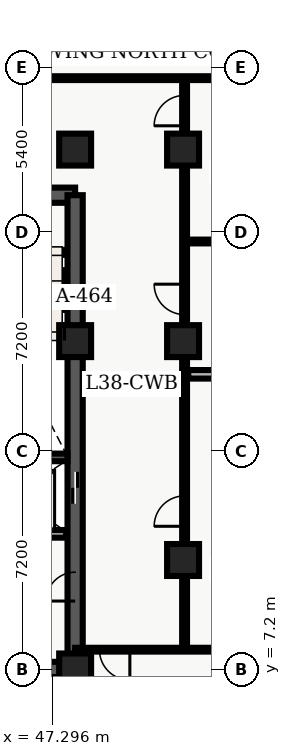
"""IFC4 building model, lengths in metres.
Left out: names, types, materials, properties, quantities, classifications, styles, units other than length and angle.
Written with IfcOpenShell. Run it as: python <this file> out.ifc"""

import sys

from ifc_helpers import new_model, entity, si_unit, converted_unit, direction, frame, origin_with_axes, origin_2d_with_axis, place, context, subcontext, project, spatial, polyline, rectangle, outline, extrude, element, fill, save


model = new_model("IFC4")
c1 = context("Model", 3, precision=1e-05, world=origin_with_axes(), true_north=direction((0.0, 1.0)))
c2 = subcontext(c1, "Body", "Model", "MODEL_VIEW")
j1 = project(units=[si_unit("LENGTHUNIT", "METRE"), converted_unit("PLANEANGLEUNIT", "DEGREE", entity("IfcPlaneAngleMeasure", 0.017), si_unit("PLANEANGLEUNIT", "RADIAN"), dimensions=[0, 0, 0, 0, 0, 0, 0])], contexts=[c1])
p1 = place(None, origin_with_axes())
s1 = spatial("IfcSite", under=j1, at=p1, CompositionType="ELEMENT")
p2 = place(p1, origin_with_axes())
s2 = spatial("IfcBuilding", under=s1, at=p2, CompositionType="ELEMENT")
p3 = place(p2, frame((0.0, 0.0, 156.3), z_axis=(0.0, 0.0, 1.0), x_axis=(1.0, 0.0, 0.0)))
s3 = spatial("IfcBuildingStorey", under=s2, at=p3, CompositionType="ELEMENT", Elevation=156.3)
p4 = place(p3, frame((40.2, 7.2, 0.0), z_axis=(0.0, 0.0, 1.0), x_axis=(1.0, 0.0, 0.0)))
e1 = element("IfcWall", 1, at=p4, inside=s3, PredefinedType="SHEAR", context=c2, shape_type="SweptSolid", body=[
    extrude(outline(polyline([(0.0, -0.25), (7.85, -0.25), (7.85, 0.25), (0.0, 0.25), (0.0, -0.25)])), origin_with_axes(), (0.0, 0.0, 1.0), 3.66),
])
p5 = place(p4, frame((2.175, 0.0, 0.0), z_axis=(0.0, 0.0, 1.0), x_axis=(1.0, 0.0, 0.0)))
e2 = element("IfcOpeningElement", 2, at=p5, cuts=e1, PredefinedType="OPENING", context=c2, shape_type="SweptSolid", body=[
    extrude(rectangle(XDim=1.05, YDim=0.52, at=origin_2d_with_axis()), origin_with_axes(), (0.0, 0.0, 1.0), 2.15),
])
p6 = place(p3, frame((40.2, 22.8, 0.0), z_axis=(0.0, 0.0, 1.0), x_axis=(1.0, 0.0, 0.0)))
e3 = element("IfcWall", 3, at=p6, inside=s3, PredefinedType="SHEAR", context=c2, shape_type="SweptSolid", body=[
    extrude(outline(polyline([(0.0, -0.25), (7.85, -0.25), (7.85, 0.25), (0.0, 0.25), (0.0, -0.25)])), origin_with_axes(), (0.0, 0.0, 1.0), 3.66),
])
p7 = place(p6, frame((5.775, 0.0, 0.0), z_axis=(0.0, 0.0, 1.0), x_axis=(1.0, 0.0, 0.0)))
e4 = element("IfcOpeningElement", 4, at=p7, cuts=e3, PredefinedType="OPENING", context=c2, shape_type="SweptSolid", body=[
    extrude(rectangle(XDim=1.05, YDim=0.52, at=origin_2d_with_axis()), origin_with_axes(), (0.0, 0.0, 1.0), 2.15),
])
p8 = place(p3, frame((48.05, 7.2, 0.0), z_axis=(0.0, 0.0, 1.0), x_axis=(0.0, 1.0, 0.0)))
e5 = element("IfcWall", 5, at=p8, inside=s3, PredefinedType="SHEAR", context=c2, shape_type="SweptSolid", body=[
    extrude(outline(polyline([(0.0, -0.25), (15.6, -0.25), (15.6, 0.25), (0.0, 0.25), (0.0, -0.25)])), origin_with_axes(), (0.0, 0.0, 1.0), 3.66),
])
p9 = place(p8, frame((5.975, 0.0, 0.0), z_axis=(0.0, 0.0, 1.0), x_axis=(1.0, 0.0, 0.0)))
e6 = element("IfcOpeningElement", 6, at=p9, cuts=e5, PredefinedType="OPENING", context=c2, shape_type="SweptSolid", body=[
    extrude(rectangle(XDim=1.05, YDim=0.52, at=origin_2d_with_axis()), origin_with_axes(), (0.0, 0.0, 1.0), 2.15),
])
p10 = place(p8, frame((2.725, 0.0, 0.0), z_axis=(0.0, 0.0, 1.0), x_axis=(1.0, 0.0, 0.0)))
e7 = element("IfcOpeningElement", 7, at=p10, cuts=e5, PredefinedType="OPENING", context=c2, shape_type="SweptSolid", body=[
    extrude(rectangle(XDim=0.95, YDim=0.52, at=origin_2d_with_axis()), origin_with_axes(), (0.0, 0.0, 1.0), 2.15),
])
p11 = place(p3, frame((44.25, 14.175, 0.0), z_axis=(0.0, 0.0, 1.0), x_axis=(1.0, 0.0, 0.0)))
e8 = element("IfcWall", 8, at=p11, inside=s3, PredefinedType="SHEAR", context=c2, shape_type="SweptSolid", body=[
    extrude(outline(polyline([(0.0, -0.125), (3.55, -0.125), (3.55, 0.125), (0.0, 0.125), (0.0, -0.125)])), origin_with_axes(), (0.0, 0.0, 1.0), 3.66),
])
for number, where, z_axis, x_axis in (
    (9, (48.05, 7.2, 0.0), (0.0, 0.0, 1.0), (1.0, 0.0, 0.0)),
    (10, (48.05, 18.0, 0.0), (0.0, 0.0, 1.0), (1.0, 0.0, 0.0)),
    (11, (48.05, 24.3, 0.0), (0.0, 0.0, 1.0), (1.0, 0.0, 0.0)),
    (12, (51.6, 10.8, 0.0), (0.0, 0.0, 1.0), (1.0, 0.0, 0.0)),
    (13, (51.6, 18.0, 0.0), (0.0, 0.0, 1.0), (1.0, 0.0, 0.0)),
    (14, (51.6, 24.3, 0.0), (0.0, 0.0, 1.0), (1.0, 0.0, 0.0)),
):
    element("IfcColumn", number, at=place(p3, frame(where, z_axis=z_axis, x_axis=x_axis)), inside=s3, PredefinedType="COLUMN", context=c2, shape_type="SweptSolid", body=[
        extrude(rectangle(XDim=1.05, YDim=1.05, at=origin_2d_with_axis()), origin_with_axes(), (0.0, 0.0, 1.0), 3.9),
    ])
p12 = place(p3, frame((44.25, 11.66, 0.0), z_axis=(0.0, 0.0, 1.0), x_axis=(1.0, 0.0, 0.0)))
e15 = element("IfcWall", 15, at=p12, inside=s3, PredefinedType="SOLIDWALL", context=c2, shape_type="SweptSolid", body=[
    extrude(outline(polyline([(0.0, -0.125), (3.5, -0.125), (3.5, 0.125), (0.0, 0.125), (0.0, -0.125)])), origin_with_axes(), (0.0, 0.0, 1.0), 2.7),
])
p13 = place(p3, frame((51.65, 7.85, 0.0), z_axis=(0.0, 0.0, 1.0), x_axis=(0.0, 1.0, 0.0)))
e16 = element("IfcWall", 16, at=p13, inside=s3, PredefinedType="PARTITIONING", context=c2, shape_type="SweptSolid", body=[
    extrude(outline(polyline([(0.0, -0.08), (18.8, -0.08), (18.8, 0.08), (0.0, 0.08), (0.0, -0.08)])), origin_with_axes(), (0.0, 0.0, 1.0), 2.7),
])
p14 = place(p13, frame((4.559, 0.0, 0.0), z_axis=(0.0, 0.0, 1.0), x_axis=(1.0, 0.0, 0.0)))
e17 = element("IfcOpeningElement", 17, at=p14, cuts=e16, PredefinedType="OPENING", context=c2, shape_type="SweptSolid", body=[
    extrude(rectangle(XDim=1.0, YDim=0.18, at=origin_2d_with_axis()), origin_with_axes(), (0.0, 0.0, 1.0), 2.15),
])
p15 = place(p13, frame((11.523, 0.0, 0.0), z_axis=(0.0, 0.0, 1.0), x_axis=(1.0, 0.0, 0.0)))
e18 = element("IfcOpeningElement", 18, at=p15, cuts=e16, PredefinedType="OPENING", context=c2, shape_type="SweptSolid", body=[
    extrude(rectangle(XDim=1.0, YDim=0.18, at=origin_2d_with_axis()), origin_with_axes(), (0.0, 0.0, 1.0), 2.15),
])
p16 = place(p13, frame((17.733, 0.0, 0.0), z_axis=(0.0, 0.0, 1.0), x_axis=(1.0, 0.0, 0.0)))
e19 = element("IfcOpeningElement", 19, at=p16, cuts=e16, PredefinedType="OPENING", context=c2, shape_type="SweptSolid", body=[
    extrude(rectangle(XDim=1.0, YDim=0.18, at=origin_2d_with_axis()), origin_with_axes(), (0.0, 0.0, 1.0), 2.15),
])
p17 = place(p3, frame((59.665, 7.85, 0.0), z_axis=(0.0, 0.0, 1.0), x_axis=(-1.0, 0.0, 0.0)))
e20 = element("IfcWall", 20, at=p17, inside=s3, PredefinedType="PARTITIONING", context=c2, shape_type="SweptSolid", body=[
    extrude(outline(polyline([(0.0, -0.062), (11.615, -0.062), (11.615, 0.062), (0.0, 0.062), (0.0, -0.062)])), origin_with_axes(), (0.0, 0.0, 1.0), 2.7),
])
p18 = place(p17, frame((10.315, 0.0, 0.0), z_axis=(0.0, 0.0, 1.0), x_axis=(1.0, 0.0, 0.0)))
e21 = element("IfcOpeningElement", 21, at=p18, cuts=e20, PredefinedType="OPENING", context=c2, shape_type="SweptSolid", body=[
    extrude(rectangle(XDim=1.0, YDim=0.145, at=origin_2d_with_axis()), origin_with_axes(), (0.0, 0.0, 1.0), 2.15),
])
p19 = place(p3, frame((38.735, 26.65, 0.0), z_axis=(0.0, 0.0, 1.0), x_axis=(1.0, 0.0, 0.0)))
e22 = element("IfcWall", 22, at=p19, inside=s3, PredefinedType="PARTITIONING", context=c2, shape_type="SweptSolid", body=[
    extrude(outline(polyline([(0.0, -0.062), (20.905, -0.062), (20.905, 0.062), (0.0, 0.062), (0.0, -0.062)])), origin_with_axes(), (0.0, 0.0, 1.0), 2.7),
])
p20 = place(p19, frame((4.265, 0.0, 0.0), z_axis=(0.0, 0.0, 1.0), x_axis=(1.0, 0.0, 0.0)))
e23 = element("IfcOpeningElement", 23, at=p20, cuts=e22, PredefinedType="OPENING", context=c2, shape_type="SweptSolid", body=[
    extrude(rectangle(XDim=1.0, YDim=0.145, at=origin_2d_with_axis()), origin_with_axes(), (0.0, 0.0, 1.0), 2.15),
])
p21 = place(p3, frame((51.77, 16.908, 0.0), z_axis=(0.0, 0.0, 1.0), x_axis=(1.0, 0.0, 0.0)))
e24 = element("IfcWall", 24, at=p21, inside=s3, PredefinedType="PARTITIONING", context=c2, shape_type="SweptSolid", body=[
    extrude(outline(polyline([(0.0, -0.14), (7.895, -0.14), (7.895, 0.14), (0.0, 0.14), (0.0, -0.14)])), origin_with_axes(), (0.0, 0.0, 1.0), 2.7),
])
p22 = place(p3, frame((51.77, 21.277, 0.0), z_axis=(0.0, 0.0, 1.0), x_axis=(1.0, 0.0, 0.0)))
e25 = element("IfcWall", 25, at=p22, inside=s3, PredefinedType="PARTITIONING", context=c2, shape_type="SweptSolid", body=[
    extrude(outline(polyline([(0.0, -0.062), (7.895, -0.062), (7.895, 0.062), (0.0, 0.062), (0.0, -0.062)])), origin_with_axes(), (0.0, 0.0, 1.0), 2.7),
])
p23 = place(p8, frame((5.975, 0.0, 0.0), z_axis=(0.0, 0.0, 1.0), x_axis=(1.0, 0.0, 0.0)))
e26 = element("IfcDoor", 26, at=p23, inside=s3, OperationType="SLIDING_TO_LEFT", PredefinedType="DOOR", context=c2, shape_type="SweptSolid", body=[
    extrude(rectangle(XDim=1.05, YDim=0.09, at=origin_2d_with_axis()), origin_with_axes(), (0.0, 0.0, 1.0), 2.15),
])
fill(e6, e26)
p24 = place(p8, frame((2.725, 0.0, 0.0), z_axis=(0.0, 0.0, 1.0), x_axis=(1.0, 0.0, 0.0)))
e27 = element("IfcDoor", 27, at=p24, inside=s3, OperationType="SINGLE_SWING_LEFT", PredefinedType="DOOR", context=c2, shape_type="SweptSolid", body=[
    extrude(rectangle(XDim=0.95, YDim=0.09, at=origin_2d_with_axis()), origin_with_axes(), (0.0, 0.0, 1.0), 2.15),
])
fill(e7, e27)
p25 = place(p17, frame((10.315, 0.0, 0.0), z_axis=(0.0, 0.0, 1.0), x_axis=(1.0, 0.0, 0.0)))
e28 = element("IfcDoor", 28, at=p25, inside=s3, OperationType="SINGLE_SWING_LEFT", PredefinedType="DOOR", context=c2, shape_type="SweptSolid", body=[
    extrude(rectangle(XDim=1.0, YDim=0.075, at=origin_2d_with_axis()), origin_with_axes(), (0.0, 0.0, 1.0), 2.15),
])
fill(e21, e28)
p26 = place(p13, frame((4.559, 0.0, 0.0), z_axis=(0.0, 0.0, 1.0), x_axis=(1.0, 0.0, 0.0)))
e29 = element("IfcDoor", 29, at=p26, inside=s3, OperationType="SINGLE_SWING_LEFT", PredefinedType="DOOR", context=c2, shape_type="SweptSolid", body=[
    extrude(rectangle(XDim=1.0, YDim=0.09, at=origin_2d_with_axis()), origin_with_axes(), (0.0, 0.0, 1.0), 2.15),
])
fill(e17, e29)
p27 = place(p13, frame((11.523, 0.0, 0.0), z_axis=(0.0, 0.0, 1.0), x_axis=(1.0, 0.0, 0.0)))
e30 = element("IfcDoor", 30, at=p27, inside=s3, OperationType="SINGLE_SWING_RIGHT", PredefinedType="DOOR", context=c2, shape_type="SweptSolid", body=[
    extrude(rectangle(XDim=1.0, YDim=0.09, at=origin_2d_with_axis()), origin_with_axes(), (0.0, 0.0, 1.0), 2.15),
])
fill(e18, e30)
p28 = place(p13, frame((17.733, 0.0, 0.0), z_axis=(0.0, 0.0, 1.0), x_axis=(1.0, 0.0, 0.0)))
e31 = element("IfcDoor", 31, at=p28, inside=s3, OperationType="SINGLE_SWING_LEFT", PredefinedType="DOOR", context=c2, shape_type="SweptSolid", body=[
    extrude(rectangle(XDim=1.0, YDim=0.09, at=origin_2d_with_axis()), origin_with_axes(), (0.0, 0.0, 1.0), 2.15),
])
fill(e19, e31)
save(model, sys.argv[1])
